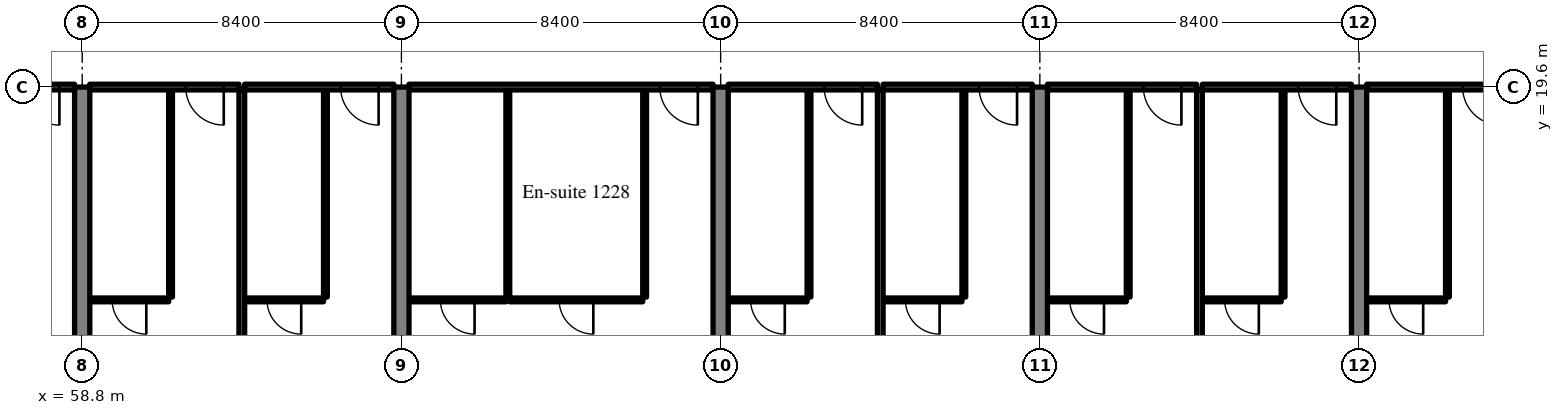
"""IFC4 building model, lengths in metres.
Left out: names, types, materials, properties, quantities, classifications, styles, units other than length and angle.
Written with IfcOpenShell. Run it as: python <this file> out.ifc"""

import sys

from ifc_helpers import new_model, si_unit, direction, frame, frame_2d, origin, place, context, subcontext, project, spatial, rectangle, extrude, source, transform, mapped, element, fill, save


model = new_model("IFC4")
c1 = context("Model", 3, precision=1e-05, world=origin(), true_north=direction((0.0, 1.0)))
c2 = subcontext(c1, "Body", "Model", "MODEL_VIEW")
j1 = project(units=[si_unit("LENGTHUNIT", "METRE"), si_unit("PLANEANGLEUNIT", "RADIAN")], contexts=[c1])
p1 = place(None, origin())
s1 = spatial("IfcSite", under=j1, at=p1, CompositionType="ELEMENT")
p2 = place(p1, origin())
s2 = spatial("IfcBuilding", under=s1, at=p2, CompositionType="ELEMENT")
p3 = place(p2, frame((0.0, 0.0, 54.4)))
s3 = spatial("IfcBuildingStorey", under=s2, at=p3, CompositionType="ELEMENT", Elevation=54.4)
m1 = source(origin(), c2, "Body", "SweptSolid", [
    extrude(rectangle(XDim=19.6, YDim=0.4, at=frame_2d((9.8, 0.0))), origin(), (0.0, 0.0, 1.0), 3.52),
])
for number, where, z_axis, x_axis in (
    (1, (58.8, 0.0, 0.0), (0.0, 0.0, 1.0), (0.0, 1.0, 0.0)),
    (2, (67.2, 0.0, 0.0), (0.0, 0.0, 1.0), (0.0, 1.0, 0.0)),
    (3, (75.6, 0.0, 0.0), (0.0, 0.0, 1.0), (0.0, 1.0, 0.0)),
    (4, (84.0, 0.0, 0.0), (0.0, 0.0, 1.0), (0.0, 1.0, 0.0)),
    (5, (92.4, 0.0, 0.0), (0.0, 0.0, 1.0), (0.0, 1.0, 0.0)),
):
    element("IfcWall", number, at=place(p3, frame(where, z_axis=z_axis, x_axis=x_axis)), inside=s3, PredefinedType="SHEAR", context=c2, shape_type="MappedRepresentation", body=[
        mapped(m1, transform((0.0, 0.0, 0.0), scale=1.0)),
    ])
m2 = source(origin(), c2, "Body", "SweptSolid", [
    extrude(rectangle(XDim=3.925, YDim=0.15, at=frame_2d((1.962, 0.0))), origin(), (0.0, 0.0, 1.0), 2.82),
])
p4 = place(p3, frame((54.675, 19.6, 0.0), z_axis=(0.0, 0.0, 1.0), x_axis=(1.0, 0.0, 0.0)))
e6 = element("IfcWall", 6, at=p4, inside=s3, PredefinedType="PARTITIONING", context=c2, shape_type="MappedRepresentation", body=[
    mapped(m2, transform((0.0, 0.0, 0.0), scale=1.0)),
])
m3 = source(origin(), c2, "Body", "SweptSolid", [
    extrude(rectangle(XDim=1.0, YDim=2.1, at=frame_2d((0.5, 1.05))), frame((0.0, 0.085, 0.0), z_axis=(0.0, -1.0, 0.0), x_axis=(1.0, 0.0, 0.0)), (0.0, 0.0, 1.0), 0.17),
])
p5 = place(p4, frame((2.525, 0.0, 0.0)))
e7 = element("IfcOpeningElement", 7, at=p5, cuts=e6, PredefinedType="OPENING", context=c2, shape_type="MappedRepresentation", body=[
    mapped(m3, transform((0.0, 0.0, 0.0), scale=1.0)),
])
m4 = source(origin(), c2, "Body", "SweptSolid", [
    extrude(rectangle(XDim=5.45, YDim=0.1, at=frame_2d((2.725, 0.0))), origin(), (0.0, 0.0, 1.0), 3.52),
])
p6 = place(p3, frame((61.125, 14.075, 0.0), z_axis=(0.0, 0.0, 1.0), x_axis=(0.0, 1.0, 0.0)))
e8 = element("IfcWall", 8, at=p6, inside=s3, PredefinedType="PARTITIONING", context=c2, shape_type="MappedRepresentation", body=[
    mapped(m4, transform((0.0, 0.0, 0.0), scale=1.0)),
])
m5 = source(origin(), c2, "Body", "SweptSolid", [
    extrude(rectangle(XDim=2.075, YDim=0.1, at=frame_2d((1.038, 0.0))), origin(), (0.0, 0.0, 1.0), 3.52),
])
p7 = place(p3, frame((59.0, 14.0, 0.0), z_axis=(0.0, 0.0, 1.0), x_axis=(1.0, 0.0, 0.0)))
e9 = element("IfcWall", 9, at=p7, inside=s3, PredefinedType="PARTITIONING", context=c2, shape_type="MappedRepresentation", body=[
    mapped(m5, transform((0.0, 0.0, 0.0), scale=1.0)),
])
m6 = source(origin(), c2, "Body", "SweptSolid", [
    extrude(rectangle(XDim=0.9, YDim=2.1, at=frame_2d((0.45, 1.05))), frame((0.0, 0.06, 0.0), z_axis=(0.0, -1.0, 0.0), x_axis=(1.0, 0.0, 0.0)), (0.0, 0.0, 1.0), 0.12),
])
p8 = place(p7, frame((0.587, 0.0, 0.0)))
e10 = element("IfcOpeningElement", 10, at=p8, cuts=e9, PredefinedType="OPENING", context=c2, shape_type="MappedRepresentation", body=[
    mapped(m6, transform((0.0, 0.0, 0.0), scale=1.0)),
])
p9 = place(p3, frame((59.0, 19.6, 0.0), z_axis=(0.0, 0.0, 1.0), x_axis=(1.0, 0.0, 0.0)))
e11 = element("IfcWall", 11, at=p9, inside=s3, PredefinedType="PARTITIONING", context=c2, shape_type="MappedRepresentation", body=[
    mapped(m2, transform((0.0, 0.0, 0.0), scale=1.0)),
])
p10 = place(p9, frame((2.525, 0.0, 0.0)))
e12 = element("IfcOpeningElement", 12, at=p10, cuts=e11, PredefinedType="OPENING", context=c2, shape_type="MappedRepresentation", body=[
    mapped(m3, transform((0.0, 0.0, 0.0), scale=1.0)),
])
p11 = place(p3, frame((65.2, 14.075, 0.0), z_axis=(0.0, 0.0, 1.0), x_axis=(0.0, 1.0, 0.0)))
e13 = element("IfcWall", 13, at=p11, inside=s3, PredefinedType="PARTITIONING", context=c2, shape_type="MappedRepresentation", body=[
    mapped(m4, transform((0.0, 0.0, 0.0), scale=1.0)),
])
p12 = place(p3, frame((63.075, 14.0, 0.0), z_axis=(0.0, 0.0, 1.0), x_axis=(1.0, 0.0, 0.0)))
e14 = element("IfcWall", 14, at=p12, inside=s3, PredefinedType="PARTITIONING", context=c2, shape_type="MappedRepresentation", body=[
    mapped(m5, transform((0.0, 0.0, 0.0), scale=1.0)),
])
p13 = place(p12, frame((0.588, 0.0, 0.0)))
e15 = element("IfcOpeningElement", 15, at=p13, cuts=e14, PredefinedType="OPENING", context=c2, shape_type="MappedRepresentation", body=[
    mapped(m6, transform((0.0, 0.0, 0.0), scale=1.0)),
])
p14 = place(p3, frame((63.075, 19.6, 0.0), z_axis=(0.0, 0.0, 1.0), x_axis=(1.0, 0.0, 0.0)))
e16 = element("IfcWall", 16, at=p14, inside=s3, PredefinedType="PARTITIONING", context=c2, shape_type="MappedRepresentation", body=[
    mapped(m2, transform((0.0, 0.0, 0.0), scale=1.0)),
])
p15 = place(p14, frame((2.525, 0.0, 0.0)))
e17 = element("IfcOpeningElement", 17, at=p15, cuts=e16, PredefinedType="OPENING", context=c2, shape_type="MappedRepresentation", body=[
    mapped(m3, transform((0.0, 0.0, 0.0), scale=1.0)),
])
m7 = source(origin(), c2, "Body", "SweptSolid", [
    extrude(rectangle(XDim=20.998, YDim=0.15, at=frame_2d((10.499, 0.0))), origin(), (0.0, 0.0, 1.0), 3.52),
])
p16 = place(p3, frame((63.0, -1.473, 0.0), z_axis=(0.0, 0.0, 1.0), x_axis=(0.0, 1.0, 0.0)))
e18 = element("IfcWall", 18, at=p16, inside=s3, PredefinedType="PARTITIONING", context=c2, shape_type="MappedRepresentation", body=[
    mapped(m7, transform((0.0, 0.0, 0.0), scale=1.0)),
])
for number, where, z_axis, x_axis in (
    (19, (73.6, 14.075, 0.0), (0.0, 0.0, 1.0), (0.0, 1.0, 0.0)),
    (20, (70.0, 14.075, 0.0), (0.0, 0.0, 1.0), (0.0, 1.0, 0.0)),
):
    element("IfcWall", number, at=place(p3, frame(where, z_axis=z_axis, x_axis=x_axis)), inside=s3, PredefinedType="PARTITIONING", context=c2, shape_type="MappedRepresentation", body=[
        mapped(m4, transform((0.0, 0.0, 0.0), scale=1.0)),
    ])
m8 = source(origin(), c2, "Body", "SweptSolid", [
    extrude(rectangle(XDim=3.5, YDim=0.1, at=frame_2d((1.75, 0.0))), origin(), (0.0, 0.0, 1.0), 3.52),
])
p17 = place(p3, frame((70.05, 14.0, 0.0), z_axis=(0.0, 0.0, 1.0), x_axis=(1.0, 0.0, 0.0)))
e21 = element("IfcWall", 21, at=p17, inside=s3, PredefinedType="PARTITIONING", context=c2, shape_type="MappedRepresentation", body=[
    mapped(m8, transform((0.0, 0.0, 0.0), scale=1.0)),
])
p18 = place(p17, frame((1.3, 0.0, 0.0)))
e22 = element("IfcOpeningElement", 22, at=p18, cuts=e21, PredefinedType="OPENING", context=c2, shape_type="MappedRepresentation", body=[
    mapped(m6, transform((0.0, 0.0, 0.0), scale=1.0)),
])
m9 = source(origin(), c2, "Body", "SweptSolid", [
    extrude(rectangle(XDim=2.55, YDim=0.1, at=frame_2d((1.275, 0.0))), origin(), (0.0, 0.0, 1.0), 3.52),
])
p19 = place(p3, frame((67.4, 14.0, 0.0), z_axis=(0.0, 0.0, 1.0), x_axis=(1.0, 0.0, 0.0)))
e23 = element("IfcWall", 23, at=p19, inside=s3, PredefinedType="PARTITIONING", context=c2, shape_type="MappedRepresentation", body=[
    mapped(m9, transform((0.0, 0.0, 0.0), scale=1.0)),
])
p20 = place(p19, frame((0.825, 0.0, 0.0)))
e24 = element("IfcOpeningElement", 24, at=p20, cuts=e23, PredefinedType="OPENING", context=c2, shape_type="MappedRepresentation", body=[
    mapped(m6, transform((0.0, 0.0, 0.0), scale=1.0)),
])
m10 = source(origin(), c2, "Body", "SweptSolid", [
    extrude(rectangle(XDim=8.0, YDim=0.15, at=frame_2d((4.0, 0.0))), origin(), (0.0, 0.0, 1.0), 2.82),
])
p21 = place(p3, frame((67.4, 19.6, 0.0), z_axis=(0.0, 0.0, 1.0), x_axis=(1.0, 0.0, 0.0)))
e25 = element("IfcWall", 25, at=p21, inside=s3, PredefinedType="PARTITIONING", context=c2, shape_type="MappedRepresentation", body=[
    mapped(m10, transform((0.0, 0.0, 0.0), scale=1.0)),
])
p22 = place(p21, frame((6.6, 0.0, 0.0)))
e26 = element("IfcOpeningElement", 26, at=p22, cuts=e25, PredefinedType="OPENING", context=c2, shape_type="MappedRepresentation", body=[
    mapped(m3, transform((0.0, 0.0, 0.0), scale=1.0)),
])
p23 = place(p3, frame((77.925, 14.075, 0.0), z_axis=(0.0, 0.0, 1.0), x_axis=(0.0, 1.0, 0.0)))
e27 = element("IfcWall", 27, at=p23, inside=s3, PredefinedType="PARTITIONING", context=c2, shape_type="MappedRepresentation", body=[
    mapped(m4, transform((0.0, 0.0, 0.0), scale=1.0)),
])
p24 = place(p3, frame((75.8, 14.0, 0.0), z_axis=(0.0, 0.0, 1.0), x_axis=(1.0, 0.0, 0.0)))
e28 = element("IfcWall", 28, at=p24, inside=s3, PredefinedType="PARTITIONING", context=c2, shape_type="MappedRepresentation", body=[
    mapped(m5, transform((0.0, 0.0, 0.0), scale=1.0)),
])
p25 = place(p24, frame((0.588, 0.0, 0.0)))
e29 = element("IfcOpeningElement", 29, at=p25, cuts=e28, PredefinedType="OPENING", context=c2, shape_type="MappedRepresentation", body=[
    mapped(m6, transform((0.0, 0.0, 0.0), scale=1.0)),
])
p26 = place(p3, frame((75.8, 19.6, 0.0), z_axis=(0.0, 0.0, 1.0), x_axis=(1.0, 0.0, 0.0)))
e30 = element("IfcWall", 30, at=p26, inside=s3, PredefinedType="PARTITIONING", context=c2, shape_type="MappedRepresentation", body=[
    mapped(m2, transform((0.0, 0.0, 0.0), scale=1.0)),
])
p27 = place(p26, frame((2.525, 0.0, 0.0)))
e31 = element("IfcOpeningElement", 31, at=p27, cuts=e30, PredefinedType="OPENING", context=c2, shape_type="MappedRepresentation", body=[
    mapped(m3, transform((0.0, 0.0, 0.0), scale=1.0)),
])
p28 = place(p3, frame((82.0, 14.075, 0.0), z_axis=(0.0, 0.0, 1.0), x_axis=(0.0, 1.0, 0.0)))
e32 = element("IfcWall", 32, at=p28, inside=s3, PredefinedType="PARTITIONING", context=c2, shape_type="MappedRepresentation", body=[
    mapped(m4, transform((0.0, 0.0, 0.0), scale=1.0)),
])
p29 = place(p3, frame((79.875, 14.0, 0.0), z_axis=(0.0, 0.0, 1.0), x_axis=(1.0, 0.0, 0.0)))
e33 = element("IfcWall", 33, at=p29, inside=s3, PredefinedType="PARTITIONING", context=c2, shape_type="MappedRepresentation", body=[
    mapped(m5, transform((0.0, 0.0, 0.0), scale=1.0)),
])
p30 = place(p29, frame((0.587, 0.0, 0.0)))
e34 = element("IfcOpeningElement", 34, at=p30, cuts=e33, PredefinedType="OPENING", context=c2, shape_type="MappedRepresentation", body=[
    mapped(m6, transform((0.0, 0.0, 0.0), scale=1.0)),
])
p31 = place(p3, frame((79.875, 19.6, 0.0), z_axis=(0.0, 0.0, 1.0), x_axis=(1.0, 0.0, 0.0)))
e35 = element("IfcWall", 35, at=p31, inside=s3, PredefinedType="PARTITIONING", context=c2, shape_type="MappedRepresentation", body=[
    mapped(m2, transform((0.0, 0.0, 0.0), scale=1.0)),
])
p32 = place(p31, frame((2.525, 0.0, 0.0)))
e36 = element("IfcOpeningElement", 36, at=p32, cuts=e35, PredefinedType="OPENING", context=c2, shape_type="MappedRepresentation", body=[
    mapped(m3, transform((0.0, 0.0, 0.0), scale=1.0)),
])
m11 = source(origin(), c2, "Body", "SweptSolid", [
    extrude(rectangle(XDim=18.725, YDim=0.15, at=frame_2d((9.362, 0.0))), origin(), (0.0, 0.0, 1.0), 3.52),
])
p33 = place(p3, frame((79.8, 0.8, 0.0), z_axis=(0.0, 0.0, 1.0), x_axis=(0.0, 1.0, 0.0)))
e37 = element("IfcWall", 37, at=p33, inside=s3, PredefinedType="PARTITIONING", context=c2, shape_type="MappedRepresentation", body=[
    mapped(m11, transform((0.0, 0.0, 0.0), scale=1.0)),
])
p34 = place(p3, frame((86.325, 14.075, 0.0), z_axis=(0.0, 0.0, 1.0), x_axis=(0.0, 1.0, 0.0)))
e38 = element("IfcWall", 38, at=p34, inside=s3, PredefinedType="PARTITIONING", context=c2, shape_type="MappedRepresentation", body=[
    mapped(m4, transform((0.0, 0.0, 0.0), scale=1.0)),
])
p35 = place(p3, frame((84.2, 14.0, 0.0), z_axis=(0.0, 0.0, 1.0), x_axis=(1.0, 0.0, 0.0)))
e39 = element("IfcWall", 39, at=p35, inside=s3, PredefinedType="PARTITIONING", context=c2, shape_type="MappedRepresentation", body=[
    mapped(m5, transform((0.0, 0.0, 0.0), scale=1.0)),
])
p36 = place(p35, frame((0.588, 0.0, 0.0)))
e40 = element("IfcOpeningElement", 40, at=p36, cuts=e39, PredefinedType="OPENING", context=c2, shape_type="MappedRepresentation", body=[
    mapped(m6, transform((0.0, 0.0, 0.0), scale=1.0)),
])
p37 = place(p3, frame((84.2, 19.6, 0.0), z_axis=(0.0, 0.0, 1.0), x_axis=(1.0, 0.0, 0.0)))
e41 = element("IfcWall", 41, at=p37, inside=s3, PredefinedType="PARTITIONING", context=c2, shape_type="MappedRepresentation", body=[
    mapped(m2, transform((0.0, 0.0, 0.0), scale=1.0)),
])
p38 = place(p37, frame((2.525, 0.0, 0.0)))
e42 = element("IfcOpeningElement", 42, at=p38, cuts=e41, PredefinedType="OPENING", context=c2, shape_type="MappedRepresentation", body=[
    mapped(m3, transform((0.0, 0.0, 0.0), scale=1.0)),
])
p39 = place(p3, frame((90.4, 14.075, 0.0), z_axis=(0.0, 0.0, 1.0), x_axis=(0.0, 1.0, 0.0)))
e43 = element("IfcWall", 43, at=p39, inside=s3, PredefinedType="PARTITIONING", context=c2, shape_type="MappedRepresentation", body=[
    mapped(m4, transform((0.0, 0.0, 0.0), scale=1.0)),
])
m12 = source(origin(), c2, "Body", "SweptSolid", [
    extrude(rectangle(XDim=2.075, YDim=0.1, at=frame_2d((1.038, 0.0))), origin(), (0.0, 0.0, 1.0), 3.52),
])
p40 = place(p3, frame((88.275, 14.0, 0.0), z_axis=(0.0, 0.0, 1.0), x_axis=(1.0, 0.0, 0.0)))
e44 = element("IfcWall", 44, at=p40, inside=s3, PredefinedType="PARTITIONING", context=c2, shape_type="MappedRepresentation", body=[
    mapped(m12, transform((0.0, 0.0, 0.0), scale=1.0)),
])
p41 = place(p40, frame((0.587, 0.0, 0.0)))
e45 = element("IfcOpeningElement", 45, at=p41, cuts=e44, PredefinedType="OPENING", context=c2, shape_type="MappedRepresentation", body=[
    mapped(m6, transform((0.0, 0.0, 0.0), scale=1.0)),
])
p42 = place(p3, frame((88.275, 19.6, 0.0), z_axis=(0.0, 0.0, 1.0), x_axis=(1.0, 0.0, 0.0)))
e46 = element("IfcWall", 46, at=p42, inside=s3, PredefinedType="PARTITIONING", context=c2, shape_type="MappedRepresentation", body=[
    mapped(m2, transform((0.0, 0.0, 0.0), scale=1.0)),
])
p43 = place(p42, frame((2.525, 0.0, 0.0)))
e47 = element("IfcOpeningElement", 47, at=p43, cuts=e46, PredefinedType="OPENING", context=c2, shape_type="MappedRepresentation", body=[
    mapped(m3, transform((0.0, 0.0, 0.0), scale=1.0)),
])
p44 = place(p3, frame((88.2, 0.8, 0.0), z_axis=(0.0, 0.0, 1.0), x_axis=(0.0, 1.0, 0.0)))
e48 = element("IfcWall", 48, at=p44, inside=s3, PredefinedType="PARTITIONING", context=c2, shape_type="MappedRepresentation", body=[
    mapped(m11, transform((0.0, 0.0, 0.0), scale=1.0)),
])
p45 = place(p3, frame((94.725, 14.075, 0.0), z_axis=(0.0, 0.0, 1.0), x_axis=(0.0, 1.0, 0.0)))
e49 = element("IfcWall", 49, at=p45, inside=s3, PredefinedType="PARTITIONING", context=c2, shape_type="MappedRepresentation", body=[
    mapped(m4, transform((0.0, 0.0, 0.0), scale=1.0)),
])
p46 = place(p3, frame((92.6, 14.0, 0.0), z_axis=(0.0, 0.0, 1.0), x_axis=(1.0, 0.0, 0.0)))
e50 = element("IfcWall", 50, at=p46, inside=s3, PredefinedType="PARTITIONING", context=c2, shape_type="MappedRepresentation", body=[
    mapped(m5, transform((0.0, 0.0, 0.0), scale=1.0)),
])
p47 = place(p46, frame((0.587, 0.0, 0.0)))
e51 = element("IfcOpeningElement", 51, at=p47, cuts=e50, PredefinedType="OPENING", context=c2, shape_type="MappedRepresentation", body=[
    mapped(m6, transform((0.0, 0.0, 0.0), scale=1.0)),
])
m13 = source(origin(), c2, "Body", "SweptSolid", [
    extrude(rectangle(XDim=3.925, YDim=0.15, at=frame_2d((1.962, 0.0))), origin(), (0.0, 0.0, 1.0), 2.82),
])
p48 = place(p3, frame((92.6, 19.6, 0.0), z_axis=(0.0, 0.0, 1.0), x_axis=(1.0, 0.0, 0.0)))
e52 = element("IfcWall", 52, at=p48, inside=s3, PredefinedType="PARTITIONING", context=c2, shape_type="MappedRepresentation", body=[
    mapped(m13, transform((0.0, 0.0, 0.0), scale=1.0)),
])
p49 = place(p48, frame((2.525, 0.0, 0.0)))
e53 = element("IfcOpeningElement", 53, at=p49, cuts=e52, PredefinedType="OPENING", context=c2, shape_type="MappedRepresentation", body=[
    mapped(m3, transform((0.0, 0.0, 0.0), scale=1.0)),
])
m14 = source(origin(), c2, "Body", "SweptSolid", [
    extrude(rectangle(XDim=1.0, YDim=2.1, at=frame_2d((0.5, 1.05))), frame((0.0, 0.025, 0.0), z_axis=(0.0, -1.0, 0.0), x_axis=(1.0, 0.0, 0.0)), (0.0, 0.0, 1.0), 0.05),
])
p50 = place(p5, origin())
e54 = element("IfcDoor", 54, at=p50, inside=s3, OperationType="SINGLE_SWING_RIGHT", PredefinedType="DOOR", context=c2, shape_type="MappedRepresentation", body=[
    mapped(m14, transform((0.0, 0.0, 0.0), scale=1.0)),
])
fill(e7, e54)
m15 = source(origin(), c2, "Body", "SweptSolid", [
    extrude(rectangle(XDim=0.9, YDim=2.1, at=frame_2d((0.45, 1.05))), frame((0.0, 0.025, 0.0), z_axis=(0.0, -1.0, 0.0), x_axis=(1.0, 0.0, 0.0)), (0.0, 0.0, 1.0), 0.05),
])
p51 = place(p8, origin())
e55 = element("IfcDoor", 55, at=p51, inside=s3, OperationType="SINGLE_SWING_RIGHT", PredefinedType="DOOR", context=c2, shape_type="MappedRepresentation", body=[
    mapped(m15, transform((0.0, 0.0, 0.0), scale=1.0)),
])
fill(e10, e55)
p52 = place(p10, origin())
e56 = element("IfcDoor", 56, at=p52, inside=s3, OperationType="SINGLE_SWING_RIGHT", PredefinedType="DOOR", context=c2, shape_type="MappedRepresentation", body=[
    mapped(m14, transform((0.0, 0.0, 0.0), scale=1.0)),
])
fill(e12, e56)
p53 = place(p13, origin())
e57 = element("IfcDoor", 57, at=p53, inside=s3, OperationType="SINGLE_SWING_RIGHT", PredefinedType="DOOR", context=c2, shape_type="MappedRepresentation", body=[
    mapped(m15, transform((0.0, 0.0, 0.0), scale=1.0)),
])
fill(e15, e57)
p54 = place(p15, origin())
e58 = element("IfcDoor", 58, at=p54, inside=s3, OperationType="SINGLE_SWING_RIGHT", PredefinedType="DOOR", context=c2, shape_type="MappedRepresentation", body=[
    mapped(m14, transform((0.0, 0.0, 0.0), scale=1.0)),
])
fill(e17, e58)
p55 = place(p18, origin())
e59 = element("IfcDoor", 59, at=p55, inside=s3, OperationType="SINGLE_SWING_RIGHT", PredefinedType="DOOR", context=c2, shape_type="MappedRepresentation", body=[
    mapped(m15, transform((0.0, 0.0, 0.0), scale=1.0)),
])
fill(e22, e59)
p56 = place(p20, origin())
e60 = element("IfcDoor", 60, at=p56, inside=s3, OperationType="SINGLE_SWING_RIGHT", PredefinedType="DOOR", context=c2, shape_type="MappedRepresentation", body=[
    mapped(m15, transform((0.0, 0.0, 0.0), scale=1.0)),
])
fill(e24, e60)
p57 = place(p22, origin())
e61 = element("IfcDoor", 61, at=p57, inside=s3, OperationType="SINGLE_SWING_RIGHT", PredefinedType="DOOR", context=c2, shape_type="MappedRepresentation", body=[
    mapped(m14, transform((0.0, 0.0, 0.0), scale=1.0)),
])
fill(e26, e61)
p58 = place(p25, origin())
e62 = element("IfcDoor", 62, at=p58, inside=s3, OperationType="SINGLE_SWING_RIGHT", PredefinedType="DOOR", context=c2, shape_type="MappedRepresentation", body=[
    mapped(m15, transform((0.0, 0.0, 0.0), scale=1.0)),
])
fill(e29, e62)
p59 = place(p27, origin())
e63 = element("IfcDoor", 63, at=p59, inside=s3, OperationType="SINGLE_SWING_RIGHT", PredefinedType="DOOR", context=c2, shape_type="MappedRepresentation", body=[
    mapped(m14, transform((0.0, 0.0, 0.0), scale=1.0)),
])
fill(e31, e63)
p60 = place(p30, origin())
e64 = element("IfcDoor", 64, at=p60, inside=s3, OperationType="SINGLE_SWING_RIGHT", PredefinedType="DOOR", context=c2, shape_type="MappedRepresentation", body=[
    mapped(m15, transform((0.0, 0.0, 0.0), scale=1.0)),
])
fill(e34, e64)
p61 = place(p32, origin())
e65 = element("IfcDoor", 65, at=p61, inside=s3, OperationType="SINGLE_SWING_RIGHT", PredefinedType="DOOR", context=c2, shape_type="MappedRepresentation", body=[
    mapped(m14, transform((0.0, 0.0, 0.0), scale=1.0)),
])
fill(e36, e65)
p62 = place(p36, origin())
e66 = element("IfcDoor", 66, at=p62, inside=s3, OperationType="SINGLE_SWING_RIGHT", PredefinedType="DOOR", context=c2, shape_type="MappedRepresentation", body=[
    mapped(m15, transform((0.0, 0.0, 0.0), scale=1.0)),
])
fill(e40, e66)
p63 = place(p38, origin())
e67 = element("IfcDoor", 67, at=p63, inside=s3, OperationType="SINGLE_SWING_RIGHT", PredefinedType="DOOR", context=c2, shape_type="MappedRepresentation", body=[
    mapped(m14, transform((0.0, 0.0, 0.0), scale=1.0)),
])
fill(e42, e67)
p64 = place(p41, origin())
e68 = element("IfcDoor", 68, at=p64, inside=s3, OperationType="SINGLE_SWING_RIGHT", PredefinedType="DOOR", context=c2, shape_type="MappedRepresentation", body=[
    mapped(m15, transform((0.0, 0.0, 0.0), scale=1.0)),
])
fill(e45, e68)
p65 = place(p43, origin())
e69 = element("IfcDoor", 69, at=p65, inside=s3, OperationType="SINGLE_SWING_RIGHT", PredefinedType="DOOR", context=c2, shape_type="MappedRepresentation", body=[
    mapped(m14, transform((0.0, 0.0, 0.0), scale=1.0)),
])
fill(e47, e69)
p66 = place(p47, origin())
e70 = element("IfcDoor", 70, at=p66, inside=s3, OperationType="SINGLE_SWING_RIGHT", PredefinedType="DOOR", context=c2, shape_type="MappedRepresentation", body=[
    mapped(m15, transform((0.0, 0.0, 0.0), scale=1.0)),
])
fill(e51, e70)
p67 = place(p49, origin())
e71 = element("IfcDoor", 71, at=p67, inside=s3, OperationType="SINGLE_SWING_RIGHT", PredefinedType="DOOR", context=c2, shape_type="MappedRepresentation", body=[
    mapped(m14, transform((0.0, 0.0, 0.0), scale=1.0)),
])
fill(e53, e71)
save(model, sys.argv[1])
